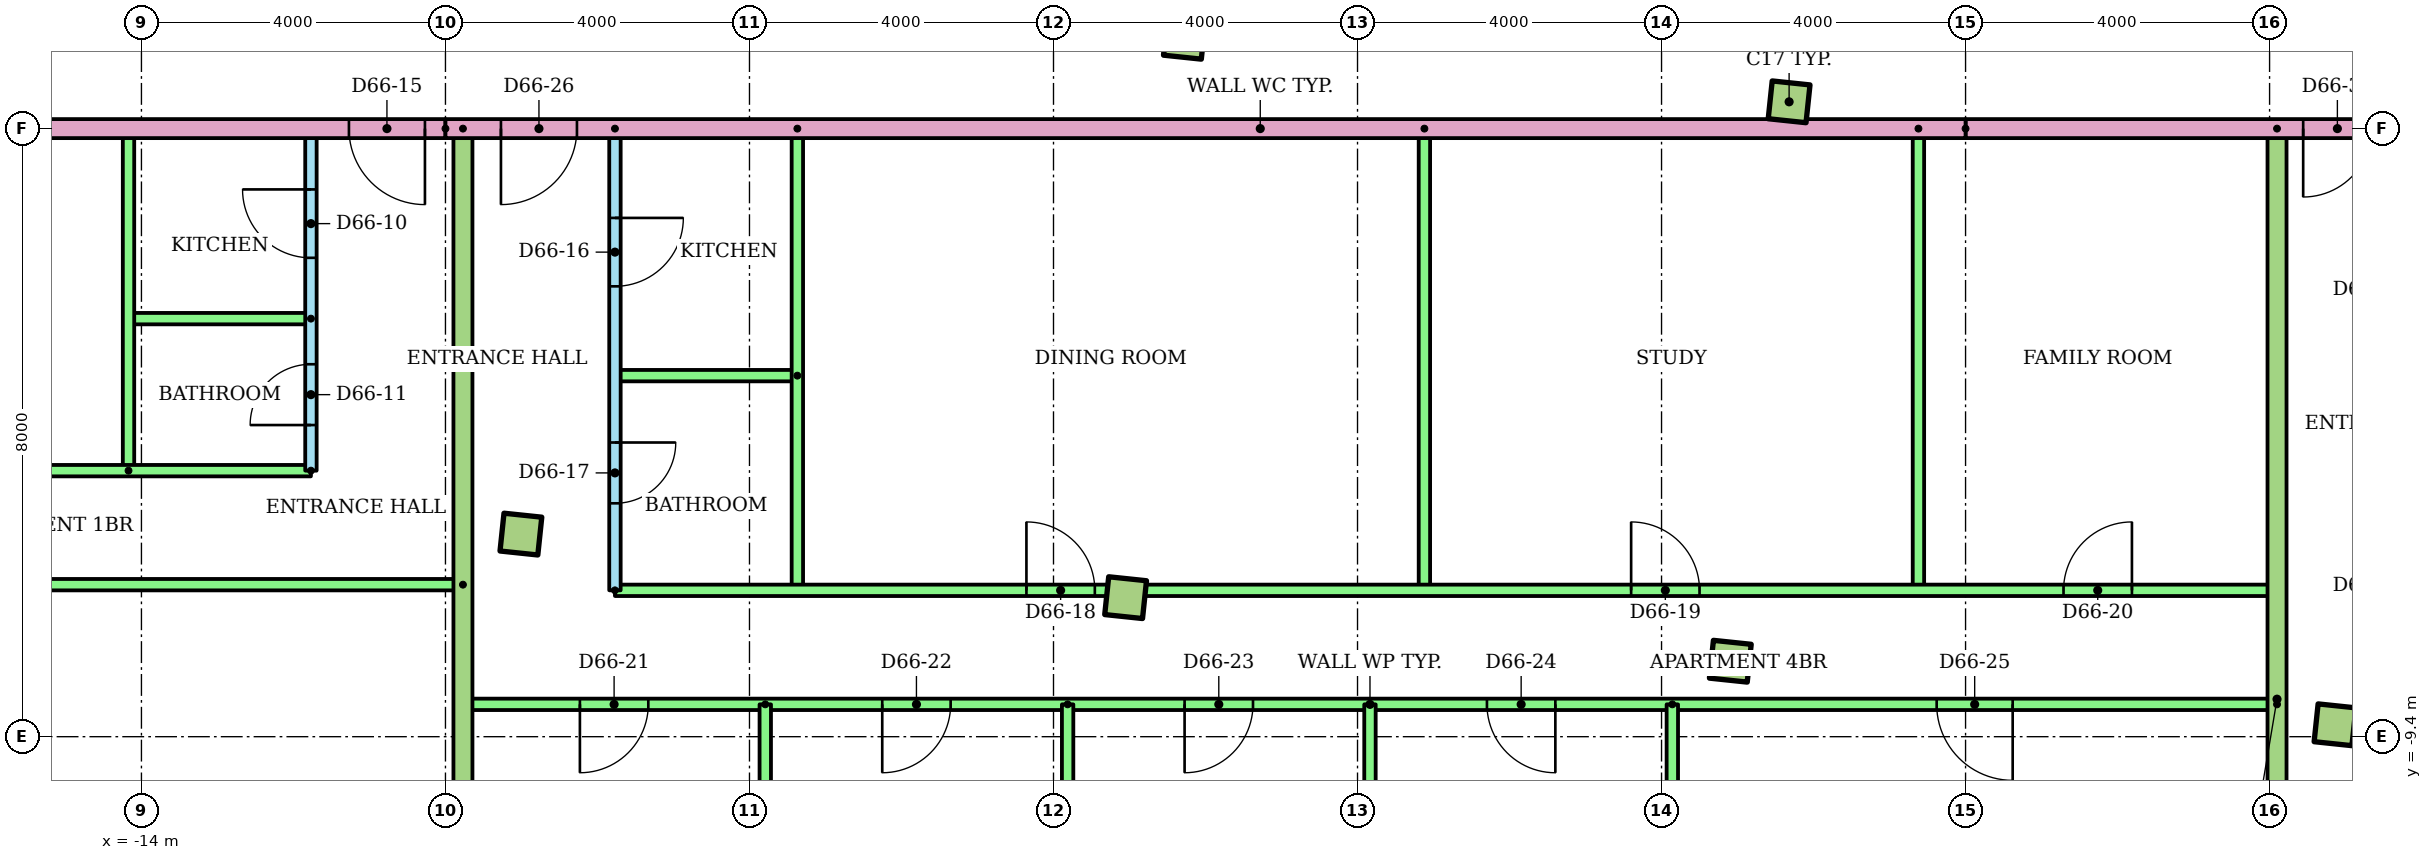
"""IFC4 building model, lengths in metres.
Left out: names, types, materials, properties, quantities, classifications, styles, units other than length and angle.
Written with IfcOpenShell. Run it as: python <this file> out.ifc"""

import sys

from ifc_helpers import new_model, si_unit, direction, frame, frame_2d, origin, origin_2d, place, context, subcontext, project, spatial, rectangle, extrude, element, fill, save


model = new_model("IFC4")
c1 = context("Model", 3, precision=1e-05, world=origin(), true_north=direction((0.0, 1.0)))
c2 = subcontext(c1, "Body", "Model", "MODEL_VIEW")
j1 = project(units=[si_unit("LENGTHUNIT", "METRE"), si_unit("PLANEANGLEUNIT", "RADIAN")], contexts=[c1])
p1 = place(None, origin())
s1 = spatial("IfcSite", under=j1, at=p1, CompositionType="ELEMENT")
p2 = place(p1, origin())
s2 = spatial("IfcBuilding", under=s1, at=p2, CompositionType="ELEMENT")
p3 = place(p2, frame((0.0, 0.0, 256.3)))
s3 = spatial("IfcBuildingStorey", under=s2, at=p3, CompositionType="ELEMENT", Elevation=256.3)
for number, where, z_axis, x_axis in (
    (1, (-9.007, -6.735, 0.0), (0.0, 0.0, 1.0), (0.995, -0.105, 0.0)),
    (2, (-1.051, -7.571, 0.0), (0.0, 0.0, 1.0), (0.995, -0.105, 0.0)),
    (3, (6.905, -8.407, 0.0), (0.0, 0.0, 1.0), (0.995, -0.105, 0.0)),
    (4, (14.861, -9.243, 0.0), (0.0, 0.0, 1.0), (0.995, -0.105, 0.0)),
    (5, (-0.278, -0.211, 0.0), (0.0, 0.0, 1.0), (0.995, -0.105, 0.0)),
    (6, (7.678, -1.048, 0.0), (0.0, 0.0, 1.0), (0.995, -0.105, 0.0)),
):
    element("IfcColumn", number, at=place(p3, frame(where, z_axis=z_axis, x_axis=x_axis)), inside=s3, PredefinedType="COLUMN", context=c2, shape_type="SweptSolid", body=[
        extrude(rectangle(XDim=0.5, YDim=0.5, at=origin_2d()), origin(), (0.0, 0.0, 1.0), 3.2),
    ])
p4 = place(p3, frame((-11.77, -5.9, 0.0), z_axis=(0.0, 0.0, 1.0), x_axis=(0.0, 1.0, 0.0)))
e7 = element("IfcWall", 7, at=p4, inside=s3, PredefinedType="PARTITIONING", context=c2, shape_type="SweptSolid", body=[
    extrude(rectangle(XDim=4.5, YDim=0.15, at=frame_2d((2.25, 0.0))), origin(), (0.0, 0.0, 1.0), 2.4),
])
p5 = place(p4, frame((2.8, 0.0, 0.0)))
e8 = element("IfcOpeningElement", 8, at=p5, cuts=e7, PredefinedType="OPENING", context=c2, shape_type="SweptSolid", body=[
    extrude(rectangle(XDim=0.9, YDim=2.1, at=frame_2d((0.45, 1.05))), frame((0.0, 0.085, 0.0), z_axis=(0.0, -1.0, 0.0), x_axis=(1.0, 0.0, 0.0)), (0.0, 0.0, 1.0), 0.17),
])
p6 = place(p4, frame((0.6, 0.0, 0.0)))
e9 = element("IfcOpeningElement", 9, at=p6, cuts=e7, PredefinedType="OPENING", context=c2, shape_type="SweptSolid", body=[
    extrude(rectangle(XDim=0.8, YDim=2.1, at=frame_2d((0.4, 1.05))), frame((0.0, 0.085, 0.0), z_axis=(0.0, -1.0, 0.0), x_axis=(1.0, 0.0, 0.0)), (0.0, 0.0, 1.0), 0.17),
])
p7 = place(p3, frame((-11.77, -3.9, 0.0), z_axis=(0.0, 0.0, 1.0), x_axis=(-1.0, 0.0, 0.0)))
e10 = element("IfcWall", 10, at=p7, inside=s3, PredefinedType="PARTITIONING", context=c2, shape_type="SweptSolid", body=[
    extrude(rectangle(XDim=2.4, YDim=0.15, at=frame_2d((1.2, 0.0))), origin(), (0.0, 0.0, 1.0), 2.4),
])
p8 = place(p3, frame((-14.17, -5.9, 0.0), z_axis=(0.0, 0.0, 1.0), x_axis=(0.0, 1.0, 0.0)))
e11 = element("IfcWall", 11, at=p8, inside=s3, PredefinedType="PARTITIONING", context=c2, shape_type="SweptSolid", body=[
    extrude(rectangle(XDim=4.5, YDim=0.15, at=frame_2d((2.25, 0.0))), origin(), (0.0, 0.0, 1.0), 2.4),
])
p9 = place(p3, frame((-24.023, -5.9, 0.0)))
e12 = element("IfcWall", 12, at=p9, inside=s3, PredefinedType="PARTITIONING", context=c2, shape_type="SweptSolid", body=[
    extrude(rectangle(XDim=12.253, YDim=0.15, at=frame_2d((6.127, 0.0))), origin(), (0.0, 0.0, 1.0), 2.4),
])
p10 = place(p9, frame((7.465, 0.0, 0.0)))
e13 = element("IfcOpeningElement", 13, at=p10, cuts=e12, PredefinedType="OPENING", context=c2, shape_type="SweptSolid", body=[
    extrude(rectangle(XDim=0.9, YDim=2.1, at=frame_2d((0.45, 1.05))), frame((0.0, 0.085, 0.0), z_axis=(0.0, -1.0, 0.0), x_axis=(1.0, 0.0, 0.0)), (0.0, 0.0, 1.0), 0.17),
])
p11 = place(p9, frame((2.494, 0.0, 0.0)))
e14 = element("IfcOpeningElement", 14, at=p11, cuts=e12, PredefinedType="OPENING", context=c2, shape_type="SweptSolid", body=[
    extrude(rectangle(XDim=0.9, YDim=2.1, at=frame_2d((0.45, 1.05))), frame((0.0, 0.085, 0.0), z_axis=(0.0, -1.0, 0.0), x_axis=(1.0, 0.0, 0.0)), (0.0, 0.0, 1.0), 0.17),
])
p12 = place(p3, frame((-9.77, -7.4, 0.0), z_axis=(0.0, 0.0, 1.0), x_axis=(-1.0, 0.0, 0.0)))
e15 = element("IfcWall", 15, at=p12, inside=s3, PredefinedType="PARTITIONING", context=c2, shape_type="SweptSolid", body=[
    extrude(rectangle(XDim=14.411, YDim=0.15, at=frame_2d((7.206, 0.0))), origin(), (0.0, 0.0, 1.0), 2.4),
])
p13 = place(p12, frame((5.789, 0.0, 0.0)))
e16 = element("IfcOpeningElement", 16, at=p13, cuts=e15, PredefinedType="OPENING", context=c2, shape_type="SweptSolid", body=[
    extrude(rectangle(XDim=1.0, YDim=2.1, at=frame_2d((0.5, 1.05))), frame((0.0, 0.085, 0.0), z_axis=(0.0, -1.0, 0.0), x_axis=(1.0, 0.0, 0.0)), (0.0, 0.0, 1.0), 0.17),
])
p14 = place(p3, frame((-7.77, -1.4, 0.0), z_axis=(0.0, 0.0, 1.0), x_axis=(0.0, -1.0, 0.0)))
e17 = element("IfcWall", 17, at=p14, inside=s3, PredefinedType="PARTITIONING", context=c2, shape_type="SweptSolid", body=[
    extrude(rectangle(XDim=6.075, YDim=0.15, at=frame_2d((3.037, 0.0))), origin(), (0.0, 0.0, 1.0), 2.4),
])
p15 = place(p14, frame((1.175, 0.0, 0.0)))
e18 = element("IfcOpeningElement", 18, at=p15, cuts=e17, PredefinedType="OPENING", context=c2, shape_type="SweptSolid", body=[
    extrude(rectangle(XDim=0.9, YDim=2.1, at=frame_2d((0.45, 1.05))), frame((0.0, 0.085, 0.0), z_axis=(0.0, -1.0, 0.0), x_axis=(1.0, 0.0, 0.0)), (0.0, 0.0, 1.0), 0.17),
])
p16 = place(p14, frame((4.13, 0.0, 0.0)))
e19 = element("IfcOpeningElement", 19, at=p16, cuts=e17, PredefinedType="OPENING", context=c2, shape_type="SweptSolid", body=[
    extrude(rectangle(XDim=0.8, YDim=2.1, at=frame_2d((0.4, 1.05))), frame((0.0, 0.085, 0.0), z_axis=(0.0, -1.0, 0.0), x_axis=(1.0, 0.0, 0.0)), (0.0, 0.0, 1.0), 0.17),
])
p17 = place(p3, frame((-5.37, -4.65, 0.0), z_axis=(0.0, 0.0, 1.0), x_axis=(-1.0, 0.0, 0.0)))
e20 = element("IfcWall", 20, at=p17, inside=s3, PredefinedType="PARTITIONING", context=c2, shape_type="SweptSolid", body=[
    extrude(rectangle(XDim=2.4, YDim=0.15, at=frame_2d((1.2, 0.0))), origin(), (0.0, 0.0, 1.0), 2.4),
])
for number, where, z_axis, x_axis in (
    (21, (-5.37, -1.4, 0.0), (0.0, 0.0, 1.0), (0.0, -1.0, 0.0)),
    (22, (2.88, -1.4, 0.0), (0.0, 0.0, 1.0), (0.0, -1.0, 0.0)),
    (23, (9.38, -1.4, 0.0), (0.0, 0.0, 1.0), (0.0, -1.0, 0.0)),
):
    element("IfcWall", number, at=place(p3, frame(where, z_axis=z_axis, x_axis=x_axis)), inside=s3, PredefinedType="PARTITIONING", context=c2, shape_type="SweptSolid", body=[
        extrude(rectangle(XDim=6.075, YDim=0.15, at=frame_2d((3.037, 0.0))), origin(), (0.0, 0.0, 1.0), 2.4),
    ])
p18 = place(p3, frame((-7.77, -7.475, 0.0)))
e24 = element("IfcWall", 24, at=p18, inside=s3, PredefinedType="PARTITIONING", context=c2, shape_type="SweptSolid", body=[
    extrude(rectangle(XDim=21.868, YDim=0.15, at=frame_2d((10.934, 0.0))), origin(), (0.0, 0.0, 1.0), 2.4),
])
p19 = place(p18, frame((5.414, 0.0, 0.0)))
e25 = element("IfcOpeningElement", 25, at=p19, cuts=e24, PredefinedType="OPENING", context=c2, shape_type="SweptSolid", body=[
    extrude(rectangle(XDim=0.9, YDim=2.1, at=frame_2d((0.45, 1.05))), frame((0.0, 0.085, 0.0), z_axis=(0.0, -1.0, 0.0), x_axis=(1.0, 0.0, 0.0)), (0.0, 0.0, 1.0), 0.17),
])
p20 = place(p18, frame((13.37, 0.0, 0.0)))
e26 = element("IfcOpeningElement", 26, at=p20, cuts=e24, PredefinedType="OPENING", context=c2, shape_type="SweptSolid", body=[
    extrude(rectangle(XDim=0.9, YDim=2.1, at=frame_2d((0.45, 1.05))), frame((0.0, 0.085, 0.0), z_axis=(0.0, -1.0, 0.0), x_axis=(1.0, 0.0, 0.0)), (0.0, 0.0, 1.0), 0.17),
])
p21 = place(p18, frame((19.059, 0.0, 0.0)))
e27 = element("IfcOpeningElement", 27, at=p21, cuts=e24, PredefinedType="OPENING", context=c2, shape_type="SweptSolid", body=[
    extrude(rectangle(XDim=0.9, YDim=2.1, at=frame_2d((0.45, 1.05))), frame((0.0, 0.085, 0.0), z_axis=(0.0, -1.0, 0.0), x_axis=(1.0, 0.0, 0.0)), (0.0, 0.0, 1.0), 0.17),
])
p22 = place(p3, frame((14.098, -8.975, 0.0), z_axis=(0.0, 0.0, 1.0), x_axis=(-1.0, 0.0, 0.0)))
e28 = element("IfcWall", 28, at=p22, inside=s3, PredefinedType="PARTITIONING", context=c2, shape_type="SweptSolid", body=[
    extrude(rectangle(XDim=23.868, YDim=0.15, at=frame_2d((11.934, 0.0))), origin(), (0.0, 0.0, 1.0), 2.4),
])
p23 = place(p22, frame((21.429, 0.0, 0.0)))
e29 = element("IfcOpeningElement", 29, at=p23, cuts=e28, PredefinedType="OPENING", context=c2, shape_type="SweptSolid", body=[
    extrude(rectangle(XDim=0.9, YDim=2.1, at=frame_2d((0.45, 1.05))), frame((0.0, 0.085, 0.0), z_axis=(0.0, -1.0, 0.0), x_axis=(1.0, 0.0, 0.0)), (0.0, 0.0, 1.0), 0.17),
])
p24 = place(p22, frame((17.451, 0.0, 0.0)))
e30 = element("IfcOpeningElement", 30, at=p24, cuts=e28, PredefinedType="OPENING", context=c2, shape_type="SweptSolid", body=[
    extrude(rectangle(XDim=0.9, YDim=2.1, at=frame_2d((0.45, 1.05))), frame((0.0, 0.085, 0.0), z_axis=(0.0, -1.0, 0.0), x_axis=(1.0, 0.0, 0.0)), (0.0, 0.0, 1.0), 0.17),
])
p25 = place(p22, frame((13.473, 0.0, 0.0)))
e31 = element("IfcOpeningElement", 31, at=p25, cuts=e28, PredefinedType="OPENING", context=c2, shape_type="SweptSolid", body=[
    extrude(rectangle(XDim=0.9, YDim=2.1, at=frame_2d((0.45, 1.05))), frame((0.0, 0.085, 0.0), z_axis=(0.0, -1.0, 0.0), x_axis=(1.0, 0.0, 0.0)), (0.0, 0.0, 1.0), 0.17),
])
p26 = place(p22, frame((9.495, 0.0, 0.0)))
e32 = element("IfcOpeningElement", 32, at=p26, cuts=e28, PredefinedType="OPENING", context=c2, shape_type="SweptSolid", body=[
    extrude(rectangle(XDim=0.9, YDim=2.1, at=frame_2d((0.45, 1.05))), frame((0.0, 0.085, 0.0), z_axis=(0.0, -1.0, 0.0), x_axis=(1.0, 0.0, 0.0)), (0.0, 0.0, 1.0), 0.17),
])
p27 = place(p22, frame((3.478, 0.0, 0.0)))
e33 = element("IfcOpeningElement", 33, at=p27, cuts=e28, PredefinedType="OPENING", context=c2, shape_type="SweptSolid", body=[
    extrude(rectangle(XDim=1.0, YDim=2.1, at=frame_2d((0.5, 1.05))), frame((0.0, 0.085, 0.0), z_axis=(0.0, -1.0, 0.0), x_axis=(1.0, 0.0, 0.0)), (0.0, 0.0, 1.0), 0.17),
])
p28 = place(p3, frame((-5.792, -8.975, 0.0), z_axis=(0.0, 0.0, 1.0), x_axis=(0.0, -1.0, 0.0)))
e34 = element("IfcWall", 34, at=p28, inside=s3, PredefinedType="PARTITIONING", context=c2, shape_type="SweptSolid", body=[
    extrude(rectangle(XDim=5.359, YDim=0.15, at=frame_2d((2.679, 0.0))), origin(), (0.0, 0.0, 1.0), 2.4),
])
p29 = place(p3, frame((-1.814, -8.975, 0.0), z_axis=(0.0, 0.0, 1.0), x_axis=(0.0, -1.0, 0.0)))
e35 = element("IfcWall", 35, at=p29, inside=s3, PredefinedType="PARTITIONING", context=c2, shape_type="SweptSolid", body=[
    extrude(rectangle(XDim=5.766, YDim=0.15, at=frame_2d((2.883, 0.0))), origin(), (0.0, 0.0, 1.0), 2.4),
])
p30 = place(p3, frame((2.164, -8.975, 0.0), z_axis=(0.0, 0.0, 1.0), x_axis=(0.0, -1.0, 0.0)))
e36 = element("IfcWall", 36, at=p30, inside=s3, PredefinedType="PARTITIONING", context=c2, shape_type="SweptSolid", body=[
    extrude(rectangle(XDim=6.195, YDim=0.15, at=frame_2d((3.097, 0.0))), origin(), (0.0, 0.0, 1.0), 2.4),
])
p31 = place(p3, frame((6.142, -8.975, 0.0), z_axis=(0.0, 0.0, 1.0), x_axis=(0.0, -1.0, 0.0)))
e37 = element("IfcWall", 37, at=p31, inside=s3, PredefinedType="PARTITIONING", context=c2, shape_type="SweptSolid", body=[
    extrude(rectangle(XDim=6.602, YDim=0.15, at=frame_2d((3.301, 0.0))), origin(), (0.0, 0.0, 1.0), 2.4),
])
p32 = place(p3, frame((-9.77, -1.4, 0.0), z_axis=(0.0, 0.0, 1.0), x_axis=(0.0, -1.0, 0.0)))
e38 = element("IfcWall", 38, at=p32, inside=s3, PredefinedType="PARTITIONING", context=c2, shape_type="SweptSolid", body=[
    extrude(rectangle(XDim=12.504, YDim=0.25, at=frame_2d((6.252, 0.0))), origin(), (0.0, 0.0, 1.0), 2.4),
])
p33 = place(p3, frame((14.098, -1.4, 0.0), z_axis=(0.0, 0.0, 1.0), x_axis=(0.0, -1.0, 0.0)))
e39 = element("IfcWall", 39, at=p33, inside=s3, PredefinedType="PARTITIONING", context=c2, shape_type="SweptSolid", body=[
    extrude(rectangle(XDim=15.013, YDim=0.25, at=frame_2d((7.506, 0.0))), origin(), (0.0, 0.0, 1.0), 2.4),
])
p34 = place(p3, frame((-10.0, -1.4, 0.0), z_axis=(0.0, 0.0, 1.0), x_axis=(-1.0, 0.0, 0.0)))
e40 = element("IfcWall", 40, at=p34, inside=s3, PredefinedType="PARTITIONING", context=c2, shape_type="SweptSolid", body=[
    extrude(rectangle(XDim=13.56, YDim=0.25, at=frame_2d((6.78, 0.0))), origin(), (0.0, 0.0, 1.0), 2.4),
])
p35 = place(p34, frame((0.27, 0.0, 0.0)))
e41 = element("IfcOpeningElement", 41, at=p35, cuts=e40, PredefinedType="OPENING", context=c2, shape_type="SweptSolid", body=[
    extrude(rectangle(XDim=1.0, YDim=2.1, at=frame_2d((0.5, 1.05))), frame((0.0, 0.135, 0.0), z_axis=(0.0, -1.0, 0.0), x_axis=(1.0, 0.0, 0.0)), (0.0, 0.0, 1.0), 0.27),
])
p36 = place(p3, frame((25.0, -1.4, 0.0), z_axis=(0.0, 0.0, 1.0), x_axis=(-1.0, 0.0, 0.0)))
e42 = element("IfcWall", 42, at=p36, inside=s3, PredefinedType="PARTITIONING", context=c2, shape_type="SweptSolid", body=[
    extrude(rectangle(XDim=15.0, YDim=0.25, at=frame_2d((7.5, 0.0))), origin(), (0.0, 0.0, 1.0), 2.4),
])
p37 = place(p36, frame((9.658, 0.0, 0.0)))
e43 = element("IfcOpeningElement", 43, at=p37, cuts=e42, PredefinedType="OPENING", context=c2, shape_type="SweptSolid", body=[
    extrude(rectangle(XDim=0.9, YDim=2.1, at=frame_2d((0.45, 1.05))), frame((0.0, 0.135, 0.0), z_axis=(0.0, -1.0, 0.0), x_axis=(1.0, 0.0, 0.0)), (0.0, 0.0, 1.0), 0.27),
])
p38 = place(p3, frame((10.0, -1.4, 0.0), z_axis=(0.0, 0.0, 1.0), x_axis=(-1.0, 0.0, 0.0)))
e44 = element("IfcWall", 44, at=p38, inside=s3, PredefinedType="PARTITIONING", context=c2, shape_type="SweptSolid", body=[
    extrude(rectangle(XDim=20.0, YDim=0.25, at=frame_2d((10.0, 0.0))), origin(), (0.0, 0.0, 1.0), 2.4),
])
p39 = place(p38, frame((18.27, 0.0, 0.0)))
e45 = element("IfcOpeningElement", 45, at=p39, cuts=e44, PredefinedType="OPENING", context=c2, shape_type="SweptSolid", body=[
    extrude(rectangle(XDim=1.0, YDim=2.1, at=frame_2d((0.5, 1.05))), frame((0.0, 0.135, 0.0), z_axis=(0.0, -1.0, 0.0), x_axis=(1.0, 0.0, 0.0)), (0.0, 0.0, 1.0), 0.27),
])
p40 = place(p5, origin())
e46 = element("IfcDoor", 46, at=p40, inside=s3, OperationType="SINGLE_SWING_RIGHT", PredefinedType="DOOR", context=c2, shape_type="SweptSolid", body=[
    extrude(rectangle(XDim=0.9, YDim=2.1, at=frame_2d((0.45, 1.05))), frame((0.0, 0.025, 0.0), z_axis=(0.0, -1.0, 0.0), x_axis=(1.0, 0.0, 0.0)), (0.0, 0.0, 1.0), 0.05),
])
fill(e8, e46)
p41 = place(p6, origin())
e47 = element("IfcDoor", 47, at=p41, inside=s3, OperationType="SINGLE_SWING_LEFT", PredefinedType="DOOR", context=c2, shape_type="SweptSolid", body=[
    extrude(rectangle(XDim=0.8, YDim=2.1, at=frame_2d((0.4, 1.05))), frame((0.0, 0.025, 0.0), z_axis=(0.0, -1.0, 0.0), x_axis=(1.0, 0.0, 0.0)), (0.0, 0.0, 1.0), 0.05),
])
fill(e9, e47)
p42 = place(p35, origin())
e48 = element("IfcDoor", 48, at=p42, inside=s3, OperationType="SINGLE_SWING_LEFT", PredefinedType="DOOR", context=c2, shape_type="SweptSolid", body=[
    extrude(rectangle(XDim=1.0, YDim=2.1, at=frame_2d((0.5, 1.05))), frame((0.0, 0.025, 0.0), z_axis=(0.0, -1.0, 0.0), x_axis=(1.0, 0.0, 0.0)), (0.0, 0.0, 1.0), 0.05),
])
fill(e41, e48)
p43 = place(p15, origin())
e49 = element("IfcDoor", 49, at=p43, inside=s3, OperationType="SINGLE_SWING_LEFT", PredefinedType="DOOR", context=c2, shape_type="SweptSolid", body=[
    extrude(rectangle(XDim=0.9, YDim=2.1, at=frame_2d((0.45, 1.05))), frame((0.0, 0.025, 0.0), z_axis=(0.0, -1.0, 0.0), x_axis=(1.0, 0.0, 0.0)), (0.0, 0.0, 1.0), 0.05),
])
fill(e18, e49)
p44 = place(p16, origin())
e50 = element("IfcDoor", 50, at=p44, inside=s3, OperationType="SINGLE_SWING_LEFT", PredefinedType="DOOR", context=c2, shape_type="SweptSolid", body=[
    extrude(rectangle(XDim=0.8, YDim=2.1, at=frame_2d((0.4, 1.05))), frame((0.0, 0.025, 0.0), z_axis=(0.0, -1.0, 0.0), x_axis=(1.0, 0.0, 0.0)), (0.0, 0.0, 1.0), 0.05),
])
fill(e19, e50)
p45 = place(p19, origin())
e51 = element("IfcDoor", 51, at=p45, inside=s3, OperationType="SINGLE_SWING_LEFT", PredefinedType="DOOR", context=c2, shape_type="SweptSolid", body=[
    extrude(rectangle(XDim=0.9, YDim=2.1, at=frame_2d((0.45, 1.05))), frame((0.0, 0.025, 0.0), z_axis=(0.0, -1.0, 0.0), x_axis=(1.0, 0.0, 0.0)), (0.0, 0.0, 1.0), 0.05),
])
fill(e25, e51)
p46 = place(p20, origin())
e52 = element("IfcDoor", 52, at=p46, inside=s3, OperationType="SINGLE_SWING_LEFT", PredefinedType="DOOR", context=c2, shape_type="SweptSolid", body=[
    extrude(rectangle(XDim=0.9, YDim=2.1, at=frame_2d((0.45, 1.05))), frame((0.0, 0.025, 0.0), z_axis=(0.0, -1.0, 0.0), x_axis=(1.0, 0.0, 0.0)), (0.0, 0.0, 1.0), 0.05),
])
fill(e26, e52)
p47 = place(p21, origin())
e53 = element("IfcDoor", 53, at=p47, inside=s3, OperationType="SINGLE_SWING_RIGHT", PredefinedType="DOOR", context=c2, shape_type="SweptSolid", body=[
    extrude(rectangle(XDim=0.9, YDim=2.1, at=frame_2d((0.45, 1.05))), frame((0.0, 0.025, 0.0), z_axis=(0.0, -1.0, 0.0), x_axis=(1.0, 0.0, 0.0)), (0.0, 0.0, 1.0), 0.05),
])
fill(e27, e53)
p48 = place(p23, origin())
e54 = element("IfcDoor", 54, at=p48, inside=s3, OperationType="SINGLE_SWING_RIGHT", PredefinedType="DOOR", context=c2, shape_type="SweptSolid", body=[
    extrude(rectangle(XDim=0.9, YDim=2.1, at=frame_2d((0.45, 1.05))), frame((0.0, 0.025, 0.0), z_axis=(0.0, -1.0, 0.0), x_axis=(1.0, 0.0, 0.0)), (0.0, 0.0, 1.0), 0.05),
])
fill(e29, e54)
p49 = place(p24, origin())
e55 = element("IfcDoor", 55, at=p49, inside=s3, OperationType="SINGLE_SWING_RIGHT", PredefinedType="DOOR", context=c2, shape_type="SweptSolid", body=[
    extrude(rectangle(XDim=0.9, YDim=2.1, at=frame_2d((0.45, 1.05))), frame((0.0, 0.025, 0.0), z_axis=(0.0, -1.0, 0.0), x_axis=(1.0, 0.0, 0.0)), (0.0, 0.0, 1.0), 0.05),
])
fill(e30, e55)
p50 = place(p25, origin())
e56 = element("IfcDoor", 56, at=p50, inside=s3, OperationType="SINGLE_SWING_RIGHT", PredefinedType="DOOR", context=c2, shape_type="SweptSolid", body=[
    extrude(rectangle(XDim=0.9, YDim=2.1, at=frame_2d((0.45, 1.05))), frame((0.0, 0.025, 0.0), z_axis=(0.0, -1.0, 0.0), x_axis=(1.0, 0.0, 0.0)), (0.0, 0.0, 1.0), 0.05),
])
fill(e31, e56)
p51 = place(p26, origin())
e57 = element("IfcDoor", 57, at=p51, inside=s3, OperationType="SINGLE_SWING_LEFT", PredefinedType="DOOR", context=c2, shape_type="SweptSolid", body=[
    extrude(rectangle(XDim=0.9, YDim=2.1, at=frame_2d((0.45, 1.05))), frame((0.0, 0.025, 0.0), z_axis=(0.0, -1.0, 0.0), x_axis=(1.0, 0.0, 0.0)), (0.0, 0.0, 1.0), 0.05),
])
fill(e32, e57)
p52 = place(p27, origin())
e58 = element("IfcDoor", 58, at=p52, inside=s3, OperationType="SINGLE_SWING_LEFT", PredefinedType="DOOR", context=c2, shape_type="SweptSolid", body=[
    extrude(rectangle(XDim=1.0, YDim=2.1, at=frame_2d((0.5, 1.05))), frame((0.0, 0.025, 0.0), z_axis=(0.0, -1.0, 0.0), x_axis=(1.0, 0.0, 0.0)), (0.0, 0.0, 1.0), 0.05),
])
fill(e33, e58)
p53 = place(p39, origin())
e59 = element("IfcDoor", 59, at=p53, inside=s3, OperationType="SINGLE_SWING_RIGHT", PredefinedType="DOOR", context=c2, shape_type="SweptSolid", body=[
    extrude(rectangle(XDim=1.0, YDim=2.1, at=frame_2d((0.5, 1.05))), frame((0.0, 0.025, 0.0), z_axis=(0.0, -1.0, 0.0), x_axis=(1.0, 0.0, 0.0)), (0.0, 0.0, 1.0), 0.05),
])
fill(e45, e59)
p54 = place(p37, origin())
e60 = element("IfcDoor", 60, at=p54, inside=s3, OperationType="SINGLE_SWING_RIGHT", PredefinedType="DOOR", context=c2, shape_type="SweptSolid", body=[
    extrude(rectangle(XDim=0.9, YDim=2.1, at=frame_2d((0.45, 1.05))), frame((0.0, 0.025, 0.0), z_axis=(0.0, -1.0, 0.0), x_axis=(1.0, 0.0, 0.0)), (0.0, 0.0, 1.0), 0.05),
])
fill(e43, e60)
save(model, sys.argv[1])
